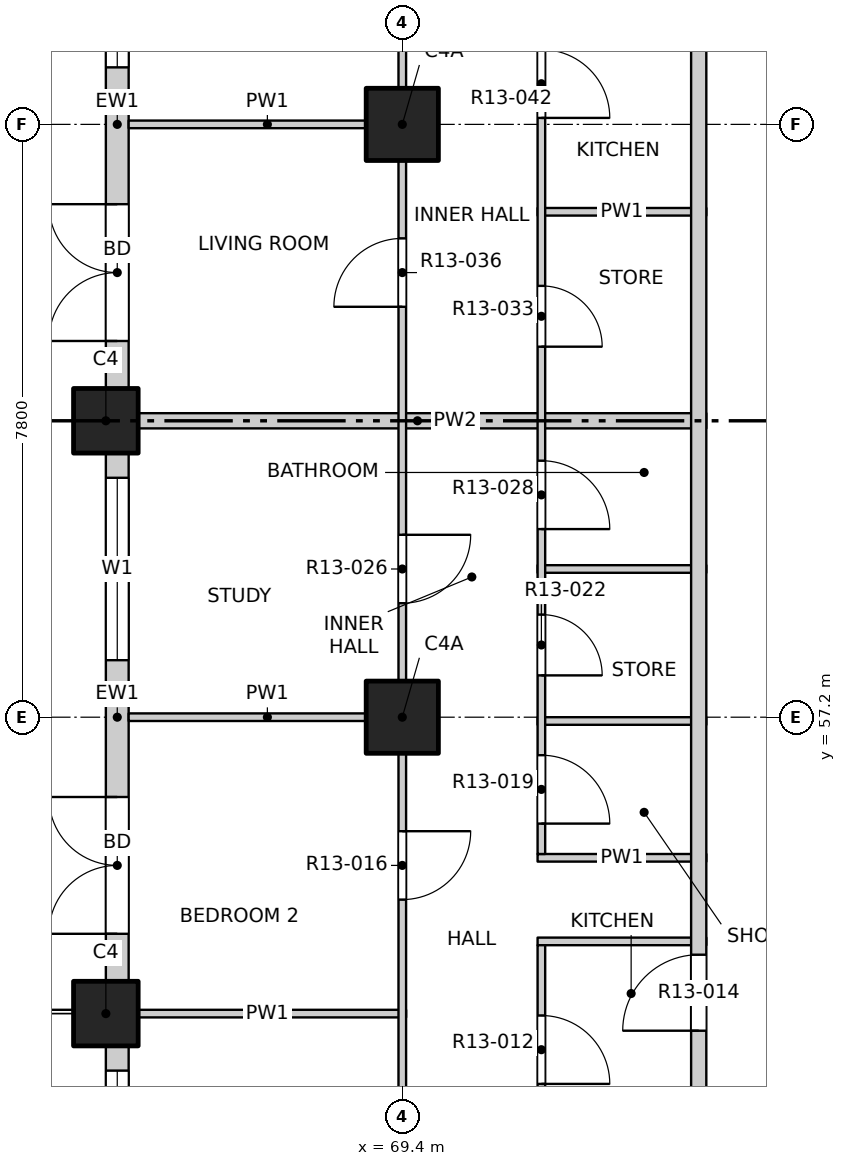
"""IFC4 building model, lengths in metres.
Left out: names, types, materials, properties, quantities, classifications, styles, units other than length and angle.
Written with IfcOpenShell. Run it as: python <this file> out.ifc"""

import sys

from ifc_helpers import new_model, si_unit, direction, frame, frame_2d, origin, origin_2d, place, context, subcontext, project, spatial, rectangle, extrude, element, fill, save


model = new_model("IFC4")
c1 = context("Model", 3, precision=1e-05, world=origin(), true_north=direction((0.0, 1.0)))
c2 = subcontext(c1, "Body", "Model", "MODEL_VIEW")
j1 = project(units=[si_unit("LENGTHUNIT", "METRE"), si_unit("PLANEANGLEUNIT", "RADIAN")], contexts=[c1])
p1 = place(None, origin())
s1 = spatial("IfcSite", under=j1, at=p1, CompositionType="ELEMENT")
p2 = place(p1, origin())
s2 = spatial("IfcBuilding", under=s1, at=p2, CompositionType="ELEMENT")
p3 = place(p2, frame((0.0, 0.0, 140.7)))
s3 = spatial("IfcBuildingStorey", under=s2, at=p3, CompositionType="ELEMENT", Elevation=140.7)
for number, where, z_axis, x_axis in (
    (1, (65.5, 53.3, -0.25), (0.0, 0.0, 1.0), (1.0, 0.0, 0.0)),
    (2, (65.5, 61.1, -0.25), (0.0, 0.0, 1.0), (1.0, 0.0, 0.0)),
):
    element("IfcColumn", number, at=place(p3, frame(where, z_axis=z_axis, x_axis=x_axis)), inside=s3, PredefinedType="COLUMN", context=c2, shape_type="SweptSolid", body=[
        extrude(rectangle(XDim=0.85, YDim=0.85, at=origin_2d()), origin(), (0.0, 0.0, 1.0), 3.35),
    ])
for number, where, z_axis, x_axis in (
    (3, (69.4, 57.2, -0.25), (0.0, 0.0, 1.0), (1.0, 0.0, 0.0)),
    (4, (69.4, 65.0, -0.25), (0.0, 0.0, 1.0), (1.0, 0.0, 0.0)),
):
    element("IfcColumn", number, at=place(p3, frame(where, z_axis=z_axis, x_axis=x_axis)), inside=s3, PredefinedType="COLUMN", context=c2, shape_type="SweptSolid", body=[
        extrude(rectangle(XDim=0.95, YDim=0.95, at=origin_2d()), origin(), (0.0, 0.0, 1.0), 3.35),
    ])
p4 = place(p3, frame((65.65, 49.4, 0.0), z_axis=(0.0, 0.0, 1.0), x_axis=(0.0, 1.0, 0.0)))
e5 = element("IfcWall", 5, at=p4, inside=s3, PredefinedType="SOLIDWALL", context=c2, shape_type="SweptSolid", body=[
    extrude(rectangle(XDim=3.475, YDim=0.3, at=frame_2d((1.738, 0.0))), origin(), (0.0, 0.0, 1.0), 3.1),
])
p5 = place(p4, frame((0.75, 0.0, 0.9)))
e6 = element("IfcOpeningElement", 6, at=p5, cuts=e5, PredefinedType="OPENING", context=c2, shape_type="SweptSolid", body=[
    extrude(rectangle(XDim=2.4, YDim=1.8, at=frame_2d((1.2, 0.9))), frame((0.0, 0.16, 0.0), z_axis=(0.0, -1.0, 0.0), x_axis=(1.0, 0.0, 0.0)), (0.0, 0.0, 1.0), 0.32),
])
p6 = place(p3, frame((65.65, 53.725, 0.0), z_axis=(0.0, 0.0, 1.0), x_axis=(0.0, 1.0, 0.0)))
e7 = element("IfcWall", 7, at=p6, inside=s3, PredefinedType="SOLIDWALL", context=c2, shape_type="SweptSolid", body=[
    extrude(rectangle(XDim=6.95, YDim=0.3, at=frame_2d((3.475, 0.0))), origin(), (0.0, 0.0, 1.0), 3.1),
])
p7 = place(p6, frame((0.625, 0.0, 0.0)))
e8 = element("IfcOpeningElement", 8, at=p7, cuts=e7, PredefinedType="OPENING", context=c2, shape_type="SweptSolid", body=[
    extrude(rectangle(XDim=1.8, YDim=2.4, at=frame_2d((0.9, 1.2))), frame((0.0, 0.16, 0.0), z_axis=(0.0, -1.0, 0.0), x_axis=(1.0, 0.0, 0.0)), (0.0, 0.0, 1.0), 0.32),
])
p8 = place(p6, frame((4.225, 0.0, 0.9)))
e9 = element("IfcOpeningElement", 9, at=p8, cuts=e7, PredefinedType="OPENING", context=c2, shape_type="SweptSolid", body=[
    extrude(rectangle(XDim=2.4, YDim=1.8, at=frame_2d((1.2, 0.9))), frame((0.0, 0.16, 0.0), z_axis=(0.0, -1.0, 0.0), x_axis=(1.0, 0.0, 0.0)), (0.0, 0.0, 1.0), 0.32),
])
p9 = place(p3, frame((65.65, 61.525, 0.0), z_axis=(0.0, 0.0, 1.0), x_axis=(0.0, 1.0, 0.0)))
e10 = element("IfcWall", 10, at=p9, inside=s3, PredefinedType="SOLIDWALL", context=c2, shape_type="SweptSolid", body=[
    extrude(rectangle(XDim=6.95, YDim=0.3, at=frame_2d((3.475, 0.0))), origin(), (0.0, 0.0, 1.0), 3.1),
])
p10 = place(p9, frame((0.625, 0.0, 0.0)))
e11 = element("IfcOpeningElement", 11, at=p10, cuts=e10, PredefinedType="OPENING", context=c2, shape_type="SweptSolid", body=[
    extrude(rectangle(XDim=1.8, YDim=2.4, at=frame_2d((0.9, 1.2))), frame((0.0, 0.16, 0.0), z_axis=(0.0, -1.0, 0.0), x_axis=(1.0, 0.0, 0.0)), (0.0, 0.0, 1.0), 0.32),
])
p11 = place(p9, frame((4.225, 0.0, 0.9)))
e12 = element("IfcOpeningElement", 12, at=p11, cuts=e10, PredefinedType="OPENING", context=c2, shape_type="SweptSolid", body=[
    extrude(rectangle(XDim=2.4, YDim=1.8, at=frame_2d((1.2, 0.9))), frame((0.0, 0.16, 0.0), z_axis=(0.0, -1.0, 0.0), x_axis=(1.0, 0.0, 0.0)), (0.0, 0.0, 1.0), 0.32),
])
p12 = place(p3, frame((65.8, 53.3, 0.0), z_axis=(0.0, 0.0, 1.0), x_axis=(1.0, 0.0, 0.0)))
e13 = element("IfcWall", 13, at=p12, inside=s3, PredefinedType="PARTITIONING", context=c2, shape_type="SweptSolid", body=[
    extrude(rectangle(XDim=3.65, YDim=0.1, at=frame_2d((1.825, 0.0))), origin(), (0.0, 0.0, 1.0), 3.1),
])
for number, where, z_axis, x_axis in (
    (14, (71.18, 54.25, 0.0), (0.0, 0.0, 1.0), (1.0, 0.0, 0.0)),
    (15, (71.18, 55.35, 0.0), (0.0, 0.0, 1.0), (1.0, 0.0, 0.0)),
    (16, (71.18, 57.15, 0.0), (0.0, 0.0, 1.0), (1.0, 0.0, 0.0)),
):
    element("IfcWall", number, at=place(p3, frame(where, z_axis=z_axis, x_axis=x_axis)), inside=s3, PredefinedType="PARTITIONING", context=c2, shape_type="SweptSolid", body=[
        extrude(rectangle(XDim=2.22, YDim=0.1, at=frame_2d((1.11, 0.0))), origin(), (0.0, 0.0, 1.0), 3.1),
    ])
p13 = place(p3, frame((65.8, 57.2, 0.0), z_axis=(0.0, 0.0, 1.0), x_axis=(1.0, 0.0, 0.0)))
e17 = element("IfcWall", 17, at=p13, inside=s3, PredefinedType="PARTITIONING", context=c2, shape_type="SweptSolid", body=[
    extrude(rectangle(XDim=3.65, YDim=0.1, at=frame_2d((1.825, 0.0))), origin(), (0.0, 0.0, 1.0), 3.1),
])
p14 = place(p3, frame((71.18, 59.15, 0.0), z_axis=(0.0, 0.0, 1.0), x_axis=(1.0, 0.0, 0.0)))
e18 = element("IfcWall", 18, at=p14, inside=s3, PredefinedType="PARTITIONING", context=c2, shape_type="SweptSolid", body=[
    extrude(rectangle(XDim=2.22, YDim=0.1, at=frame_2d((1.11, 0.0))), origin(), (0.0, 0.0, 1.0), 3.1),
])
p15 = place(p3, frame((65.8, 61.1, 0.0), z_axis=(0.0, 0.0, 1.0), x_axis=(1.0, 0.0, 0.0)))
e19 = element("IfcWall", 19, at=p15, inside=s3, PredefinedType="PARTITIONING", context=c2, shape_type="SweptSolid", body=[
    extrude(rectangle(XDim=7.6, YDim=0.2, at=frame_2d((3.8, 0.0))), origin(), (0.0, 0.0, 1.0), 3.1),
])
p16 = place(p3, frame((71.18, 63.85, 0.0), z_axis=(0.0, 0.0, 1.0), x_axis=(1.0, 0.0, 0.0)))
e20 = element("IfcWall", 20, at=p16, inside=s3, PredefinedType="PARTITIONING", context=c2, shape_type="SweptSolid", body=[
    extrude(rectangle(XDim=2.22, YDim=0.1, at=frame_2d((1.11, 0.0))), origin(), (0.0, 0.0, 1.0), 3.1),
])
p17 = place(p3, frame((65.8, 65.0, 0.0), z_axis=(0.0, 0.0, 1.0), x_axis=(1.0, 0.0, 0.0)))
e21 = element("IfcWall", 21, at=p17, inside=s3, PredefinedType="PARTITIONING", context=c2, shape_type="SweptSolid", body=[
    extrude(rectangle(XDim=3.65, YDim=0.1, at=frame_2d((1.825, 0.0))), origin(), (0.0, 0.0, 1.0), 3.1),
])
p18 = place(p3, frame((69.4, 45.8, 0.0), z_axis=(0.0, 0.0, 1.0), x_axis=(0.0, 1.0, 0.0)))
e22 = element("IfcWall", 22, at=p18, inside=s3, PredefinedType="PARTITIONING", context=c2, shape_type="SweptSolid", body=[
    extrude(rectangle(XDim=38.4, YDim=0.1, at=frame_2d((19.2, 0.0))), origin(), (0.0, 0.0, 1.0), 3.1),
])
p19 = place(p18, frame((1.05, 0.0, 0.0)))
e23 = element("IfcOpeningElement", 23, at=p19, cuts=e22, PredefinedType="OPENING", context=c2, shape_type="SweptSolid", body=[
    extrude(rectangle(XDim=1.2, YDim=2.1, at=frame_2d((0.6, 1.05))), frame((0.0, 0.06, 0.0), z_axis=(0.0, -1.0, 0.0), x_axis=(1.0, 0.0, 0.0)), (0.0, 0.0, 1.0), 0.12),
])
p20 = place(p18, frame((5.1, 0.0, 0.0)))
e24 = element("IfcOpeningElement", 24, at=p20, cuts=e22, PredefinedType="OPENING", context=c2, shape_type="SweptSolid", body=[
    extrude(rectangle(XDim=0.9, YDim=2.1, at=frame_2d((0.45, 1.05))), frame((0.0, 0.06, 0.0), z_axis=(0.0, -1.0, 0.0), x_axis=(1.0, 0.0, 0.0)), (0.0, 0.0, 1.0), 0.12),
])
p21 = place(p18, frame((9.0, 0.0, 0.0)))
e25 = element("IfcOpeningElement", 25, at=p21, cuts=e22, PredefinedType="OPENING", context=c2, shape_type="SweptSolid", body=[
    extrude(rectangle(XDim=0.9, YDim=2.1, at=frame_2d((0.45, 1.05))), frame((0.0, 0.06, 0.0), z_axis=(0.0, -1.0, 0.0), x_axis=(1.0, 0.0, 0.0)), (0.0, 0.0, 1.0), 0.12),
])
p22 = place(p18, frame((12.9, 0.0, 0.0)))
e26 = element("IfcOpeningElement", 26, at=p22, cuts=e22, PredefinedType="OPENING", context=c2, shape_type="SweptSolid", body=[
    extrude(rectangle(XDim=0.9, YDim=2.1, at=frame_2d((0.45, 1.05))), frame((0.0, 0.06, 0.0), z_axis=(0.0, -1.0, 0.0), x_axis=(1.0, 0.0, 0.0)), (0.0, 0.0, 1.0), 0.12),
])
p23 = place(p18, frame((16.8, 0.0, 0.0)))
e27 = element("IfcOpeningElement", 27, at=p23, cuts=e22, PredefinedType="OPENING", context=c2, shape_type="SweptSolid", body=[
    extrude(rectangle(XDim=0.9, YDim=2.1, at=frame_2d((0.45, 1.05))), frame((0.0, 0.06, 0.0), z_axis=(0.0, -1.0, 0.0), x_axis=(1.0, 0.0, 0.0)), (0.0, 0.0, 1.0), 0.12),
])
p24 = place(p18, frame((20.7, 0.0, 0.0)))
e28 = element("IfcOpeningElement", 28, at=p24, cuts=e22, PredefinedType="OPENING", context=c2, shape_type="SweptSolid", body=[
    extrude(rectangle(XDim=0.9, YDim=2.1, at=frame_2d((0.45, 1.05))), frame((0.0, 0.06, 0.0), z_axis=(0.0, -1.0, 0.0), x_axis=(1.0, 0.0, 0.0)), (0.0, 0.0, 1.0), 0.12),
])
p25 = place(p18, frame((24.6, 0.0, 0.0)))
e29 = element("IfcOpeningElement", 29, at=p25, cuts=e22, PredefinedType="OPENING", context=c2, shape_type="SweptSolid", body=[
    extrude(rectangle(XDim=0.9, YDim=2.1, at=frame_2d((0.45, 1.05))), frame((0.0, 0.06, 0.0), z_axis=(0.0, -1.0, 0.0), x_axis=(1.0, 0.0, 0.0)), (0.0, 0.0, 1.0), 0.12),
])
p26 = place(p18, frame((30.3, 0.0, 0.0)))
e30 = element("IfcOpeningElement", 30, at=p26, cuts=e22, PredefinedType="OPENING", context=c2, shape_type="SweptSolid", body=[
    extrude(rectangle(XDim=1.2, YDim=2.1, at=frame_2d((0.6, 1.05))), frame((0.0, 0.06, 0.0), z_axis=(0.0, -1.0, 0.0), x_axis=(1.0, 0.0, 0.0)), (0.0, 0.0, 1.0), 0.12),
])
p27 = place(p18, frame((36.15, 0.0, 0.0)))
e31 = element("IfcOpeningElement", 31, at=p27, cuts=e22, PredefinedType="OPENING", context=c2, shape_type="SweptSolid", body=[
    extrude(rectangle(XDim=1.2, YDim=2.1, at=frame_2d((0.6, 1.05))), frame((0.0, 0.06, 0.0), z_axis=(0.0, -1.0, 0.0), x_axis=(1.0, 0.0, 0.0)), (0.0, 0.0, 1.0), 0.12),
])
p28 = place(p3, frame((71.23, 49.45, 0.0), z_axis=(0.0, 0.0, 1.0), x_axis=(0.0, 1.0, 0.0)))
e32 = element("IfcWall", 32, at=p28, inside=s3, PredefinedType="PARTITIONING", context=c2, shape_type="SweptSolid", body=[
    extrude(rectangle(XDim=4.75, YDim=0.1, at=frame_2d((2.375, 0.0))), origin(), (0.0, 0.0, 1.0), 3.1),
])
p29 = place(p28, frame((0.55, 0.0, 0.0)))
e33 = element("IfcOpeningElement", 33, at=p29, cuts=e32, PredefinedType="OPENING", context=c2, shape_type="SweptSolid", body=[
    extrude(rectangle(XDim=0.8, YDim=2.1, at=frame_2d((0.4, 1.05))), frame((0.0, 0.06, 0.0), z_axis=(0.0, -1.0, 0.0), x_axis=(1.0, 0.0, 0.0)), (0.0, 0.0, 1.0), 0.12),
])
p30 = place(p28, frame((2.925, 0.0, 0.0)))
e34 = element("IfcOpeningElement", 34, at=p30, cuts=e32, PredefinedType="OPENING", context=c2, shape_type="SweptSolid", body=[
    extrude(rectangle(XDim=0.9, YDim=2.1, at=frame_2d((0.45, 1.05))), frame((0.0, 0.06, 0.0), z_axis=(0.0, -1.0, 0.0), x_axis=(1.0, 0.0, 0.0)), (0.0, 0.0, 1.0), 0.12),
])
p31 = place(p3, frame((71.23, 55.4, 0.0), z_axis=(0.0, 0.0, 1.0), x_axis=(0.0, 1.0, 0.0)))
e35 = element("IfcWall", 35, at=p31, inside=s3, PredefinedType="PARTITIONING", context=c2, shape_type="SweptSolid", body=[
    extrude(rectangle(XDim=14.75, YDim=0.1, at=frame_2d((7.375, 0.0))), origin(), (0.0, 0.0, 1.0), 3.1),
])
p32 = place(p31, frame((0.4, 0.0, 0.0)))
e36 = element("IfcOpeningElement", 36, at=p32, cuts=e35, PredefinedType="OPENING", context=c2, shape_type="SweptSolid", body=[
    extrude(rectangle(XDim=0.9, YDim=2.1, at=frame_2d((0.45, 1.05))), frame((0.0, 0.06, 0.0), z_axis=(0.0, -1.0, 0.0), x_axis=(1.0, 0.0, 0.0)), (0.0, 0.0, 1.0), 0.12),
])
p33 = place(p31, frame((2.35, 0.0, 0.0)))
e37 = element("IfcOpeningElement", 37, at=p33, cuts=e35, PredefinedType="OPENING", context=c2, shape_type="SweptSolid", body=[
    extrude(rectangle(XDim=0.8, YDim=2.1, at=frame_2d((0.4, 1.05))), frame((0.0, 0.06, 0.0), z_axis=(0.0, -1.0, 0.0), x_axis=(1.0, 0.0, 0.0)), (0.0, 0.0, 1.0), 0.12),
])
p34 = place(p31, frame((4.275, 0.0, 0.0)))
e38 = element("IfcOpeningElement", 38, at=p34, cuts=e35, PredefinedType="OPENING", context=c2, shape_type="SweptSolid", body=[
    extrude(rectangle(XDim=0.9, YDim=2.1, at=frame_2d((0.45, 1.05))), frame((0.0, 0.06, 0.0), z_axis=(0.0, -1.0, 0.0), x_axis=(1.0, 0.0, 0.0)), (0.0, 0.0, 1.0), 0.12),
])
p35 = place(p31, frame((6.675, 0.0, 0.0)))
e39 = element("IfcOpeningElement", 39, at=p35, cuts=e35, PredefinedType="OPENING", context=c2, shape_type="SweptSolid", body=[
    extrude(rectangle(XDim=0.8, YDim=2.1, at=frame_2d((0.4, 1.05))), frame((0.0, 0.06, 0.0), z_axis=(0.0, -1.0, 0.0), x_axis=(1.0, 0.0, 0.0)), (0.0, 0.0, 1.0), 0.12),
])
p36 = place(p31, frame((9.685, 0.0, 0.0)))
e40 = element("IfcOpeningElement", 40, at=p36, cuts=e35, PredefinedType="OPENING", context=c2, shape_type="SweptSolid", body=[
    extrude(rectangle(XDim=0.9, YDim=2.1, at=frame_2d((0.45, 1.05))), frame((0.0, 0.06, 0.0), z_axis=(0.0, -1.0, 0.0), x_axis=(1.0, 0.0, 0.0)), (0.0, 0.0, 1.0), 0.12),
])
p37 = place(p31, frame((12.91, 0.0, 0.0)))
e41 = element("IfcOpeningElement", 41, at=p37, cuts=e35, PredefinedType="OPENING", context=c2, shape_type="SweptSolid", body=[
    extrude(rectangle(XDim=0.8, YDim=2.1, at=frame_2d((0.4, 1.05))), frame((0.0, 0.06, 0.0), z_axis=(0.0, -1.0, 0.0), x_axis=(1.0, 0.0, 0.0)), (0.0, 0.0, 1.0), 0.12),
])
p38 = place(p3, frame((73.3, 49.5, 0.0), z_axis=(0.0, 0.0, 1.0), x_axis=(0.0, 1.0, 0.0)))
e42 = element("IfcWall", 42, at=p38, inside=s3, PredefinedType="PARTITIONING", context=c2, shape_type="SweptSolid", body=[
    extrude(rectangle(XDim=34.7, YDim=0.2, at=frame_2d((17.35, 0.0))), origin(), (0.0, 0.0, 1.0), 3.1),
])
p39 = place(p38, frame((3.575, 0.0, 0.0)))
e43 = element("IfcOpeningElement", 43, at=p39, cuts=e42, PredefinedType="OPENING", context=c2, shape_type="SweptSolid", body=[
    extrude(rectangle(XDim=1.0, YDim=2.1, at=frame_2d((0.5, 1.05))), frame((0.0, 0.11, 0.0), z_axis=(0.0, -1.0, 0.0), x_axis=(1.0, 0.0, 0.0)), (0.0, 0.0, 1.0), 0.22),
])
p40 = place(p38, frame((21.975, 0.0, 0.0)))
e44 = element("IfcOpeningElement", 44, at=p40, cuts=e42, PredefinedType="OPENING", context=c2, shape_type="SweptSolid", body=[
    extrude(rectangle(XDim=1.0, YDim=2.1, at=frame_2d((0.5, 1.05))), frame((0.0, 0.11, 0.0), z_axis=(0.0, -1.0, 0.0), x_axis=(1.0, 0.0, 0.0)), (0.0, 0.0, 1.0), 0.22),
])
p41 = place(p38, frame((29.125, 0.0, 0.0)))
e45 = element("IfcOpeningElement", 45, at=p41, cuts=e42, PredefinedType="OPENING", context=c2, shape_type="SweptSolid", body=[
    extrude(rectangle(XDim=1.0, YDim=2.1, at=frame_2d((0.5, 1.05))), frame((0.0, 0.11, 0.0), z_axis=(0.0, -1.0, 0.0), x_axis=(1.0, 0.0, 0.0)), (0.0, 0.0, 1.0), 0.22),
])
p42 = place(p5, origin())
e46 = element("IfcWindow", 46, at=p42, inside=s3, PartitioningType="DOUBLE_PANEL_VERTICAL", PredefinedType="WINDOW", context=c2, shape_type="SweptSolid", body=[
    extrude(rectangle(XDim=2.4, YDim=1.8, at=frame_2d((1.2, 0.9))), frame((0.0, 0.03, 0.0), z_axis=(0.0, -1.0, 0.0), x_axis=(1.0, 0.0, 0.0)), (0.0, 0.0, 1.0), 0.06),
])
fill(e6, e46)
p43 = place(p7, origin())
e47 = element("IfcDoor", 47, at=p43, inside=s3, OperationType="DOUBLE_DOOR_SINGLE_SWING", PredefinedType="DOOR", context=c2, shape_type="SweptSolid", body=[
    extrude(rectangle(XDim=1.8, YDim=2.4, at=frame_2d((0.9, 1.2))), frame((0.0, 0.025, 0.0), z_axis=(0.0, -1.0, 0.0), x_axis=(1.0, 0.0, 0.0)), (0.0, 0.0, 1.0), 0.05),
])
fill(e8, e47)
p44 = place(p8, origin())
e48 = element("IfcWindow", 48, at=p44, inside=s3, PartitioningType="DOUBLE_PANEL_VERTICAL", PredefinedType="WINDOW", context=c2, shape_type="SweptSolid", body=[
    extrude(rectangle(XDim=2.4, YDim=1.8, at=frame_2d((1.2, 0.9))), frame((0.0, 0.03, 0.0), z_axis=(0.0, -1.0, 0.0), x_axis=(1.0, 0.0, 0.0)), (0.0, 0.0, 1.0), 0.06),
])
fill(e9, e48)
p45 = place(p10, origin())
e49 = element("IfcDoor", 49, at=p45, inside=s3, OperationType="DOUBLE_DOOR_SINGLE_SWING", PredefinedType="DOOR", context=c2, shape_type="SweptSolid", body=[
    extrude(rectangle(XDim=1.8, YDim=2.4, at=frame_2d((0.9, 1.2))), frame((0.0, 0.025, 0.0), z_axis=(0.0, -1.0, 0.0), x_axis=(1.0, 0.0, 0.0)), (0.0, 0.0, 1.0), 0.05),
])
fill(e11, e49)
p46 = place(p11, origin())
e50 = element("IfcWindow", 50, at=p46, inside=s3, PartitioningType="DOUBLE_PANEL_VERTICAL", PredefinedType="WINDOW", context=c2, shape_type="SweptSolid", body=[
    extrude(rectangle(XDim=2.4, YDim=1.8, at=frame_2d((1.2, 0.9))), frame((0.0, 0.03, 0.0), z_axis=(0.0, -1.0, 0.0), x_axis=(1.0, 0.0, 0.0)), (0.0, 0.0, 1.0), 0.06),
])
fill(e12, e50)
p47 = place(p30, origin())
e51 = element("IfcDoor", 51, at=p47, inside=s3, OperationType="SINGLE_SWING_RIGHT", PredefinedType="DOOR", context=c2, shape_type="SweptSolid", body=[
    extrude(rectangle(XDim=0.9, YDim=2.1, at=frame_2d((0.45, 1.05))), frame((0.0, 0.025, 0.0), z_axis=(0.0, -1.0, 0.0), x_axis=(1.0, 0.0, 0.0)), (0.0, 0.0, 1.0), 0.05),
])
fill(e34, e51)
p48 = place(p39, origin())
e52 = element("IfcDoor", 52, at=p48, inside=s3, OperationType="SINGLE_SWING_LEFT", PredefinedType="DOOR", context=c2, shape_type="SweptSolid", body=[
    extrude(rectangle(XDim=1.0, YDim=2.1, at=frame_2d((0.5, 1.05))), frame((0.0, 0.025, 0.0), z_axis=(0.0, -1.0, 0.0), x_axis=(1.0, 0.0, 0.0)), (0.0, 0.0, 1.0), 0.05),
])
fill(e43, e52)
p49 = place(p21, origin())
e53 = element("IfcDoor", 53, at=p49, inside=s3, OperationType="SINGLE_SWING_LEFT", PredefinedType="DOOR", context=c2, shape_type="SweptSolid", body=[
    extrude(rectangle(XDim=0.9, YDim=2.1, at=frame_2d((0.45, 1.05))), frame((0.0, 0.025, 0.0), z_axis=(0.0, -1.0, 0.0), x_axis=(1.0, 0.0, 0.0)), (0.0, 0.0, 1.0), 0.05),
])
fill(e25, e53)
p50 = place(p32, origin())
e54 = element("IfcDoor", 54, at=p50, inside=s3, OperationType="SINGLE_SWING_RIGHT", PredefinedType="DOOR", context=c2, shape_type="SweptSolid", body=[
    extrude(rectangle(XDim=0.9, YDim=2.1, at=frame_2d((0.45, 1.05))), frame((0.0, 0.025, 0.0), z_axis=(0.0, -1.0, 0.0), x_axis=(1.0, 0.0, 0.0)), (0.0, 0.0, 1.0), 0.05),
])
fill(e36, e54)
p51 = place(p33, origin())
e55 = element("IfcDoor", 55, at=p51, inside=s3, OperationType="SINGLE_SWING_RIGHT", PredefinedType="DOOR", context=c2, shape_type="SweptSolid", body=[
    extrude(rectangle(XDim=0.8, YDim=2.1, at=frame_2d((0.4, 1.05))), frame((0.0, 0.025, 0.0), z_axis=(0.0, -1.0, 0.0), x_axis=(1.0, 0.0, 0.0)), (0.0, 0.0, 1.0), 0.05),
])
fill(e37, e55)
p52 = place(p22, origin())
e56 = element("IfcDoor", 56, at=p52, inside=s3, OperationType="SINGLE_SWING_LEFT", PredefinedType="DOOR", context=c2, shape_type="SweptSolid", body=[
    extrude(rectangle(XDim=0.9, YDim=2.1, at=frame_2d((0.45, 1.05))), frame((0.0, 0.025, 0.0), z_axis=(0.0, -1.0, 0.0), x_axis=(1.0, 0.0, 0.0)), (0.0, 0.0, 1.0), 0.05),
])
fill(e26, e56)
p53 = place(p34, origin())
e57 = element("IfcDoor", 57, at=p53, inside=s3, OperationType="SINGLE_SWING_RIGHT", PredefinedType="DOOR", context=c2, shape_type="SweptSolid", body=[
    extrude(rectangle(XDim=0.9, YDim=2.1, at=frame_2d((0.45, 1.05))), frame((0.0, 0.025, 0.0), z_axis=(0.0, -1.0, 0.0), x_axis=(1.0, 0.0, 0.0)), (0.0, 0.0, 1.0), 0.05),
])
fill(e38, e57)
p54 = place(p35, origin())
e58 = element("IfcDoor", 58, at=p54, inside=s3, OperationType="SINGLE_SWING_RIGHT", PredefinedType="DOOR", context=c2, shape_type="SweptSolid", body=[
    extrude(rectangle(XDim=0.8, YDim=2.1, at=frame_2d((0.4, 1.05))), frame((0.0, 0.025, 0.0), z_axis=(0.0, -1.0, 0.0), x_axis=(1.0, 0.0, 0.0)), (0.0, 0.0, 1.0), 0.05),
])
fill(e39, e58)
p55 = place(p23, origin())
e59 = element("IfcDoor", 59, at=p55, inside=s3, OperationType="SINGLE_SWING_LEFT", PredefinedType="DOOR", context=c2, shape_type="SweptSolid", body=[
    extrude(rectangle(XDim=0.9, YDim=2.1, at=frame_2d((0.45, 1.05))), frame((0.0, 0.025, 0.0), z_axis=(0.0, -1.0, 0.0), x_axis=(1.0, 0.0, 0.0)), (0.0, 0.0, 1.0), 0.05),
])
fill(e27, e59)
p56 = place(p36, origin())
e60 = element("IfcDoor", 60, at=p56, inside=s3, OperationType="SINGLE_SWING_RIGHT", PredefinedType="DOOR", context=c2, shape_type="SweptSolid", body=[
    extrude(rectangle(XDim=0.9, YDim=2.1, at=frame_2d((0.45, 1.05))), frame((0.0, 0.025, 0.0), z_axis=(0.0, -1.0, 0.0), x_axis=(1.0, 0.0, 0.0)), (0.0, 0.0, 1.0), 0.05),
])
fill(e40, e60)
save(model, sys.argv[1])
